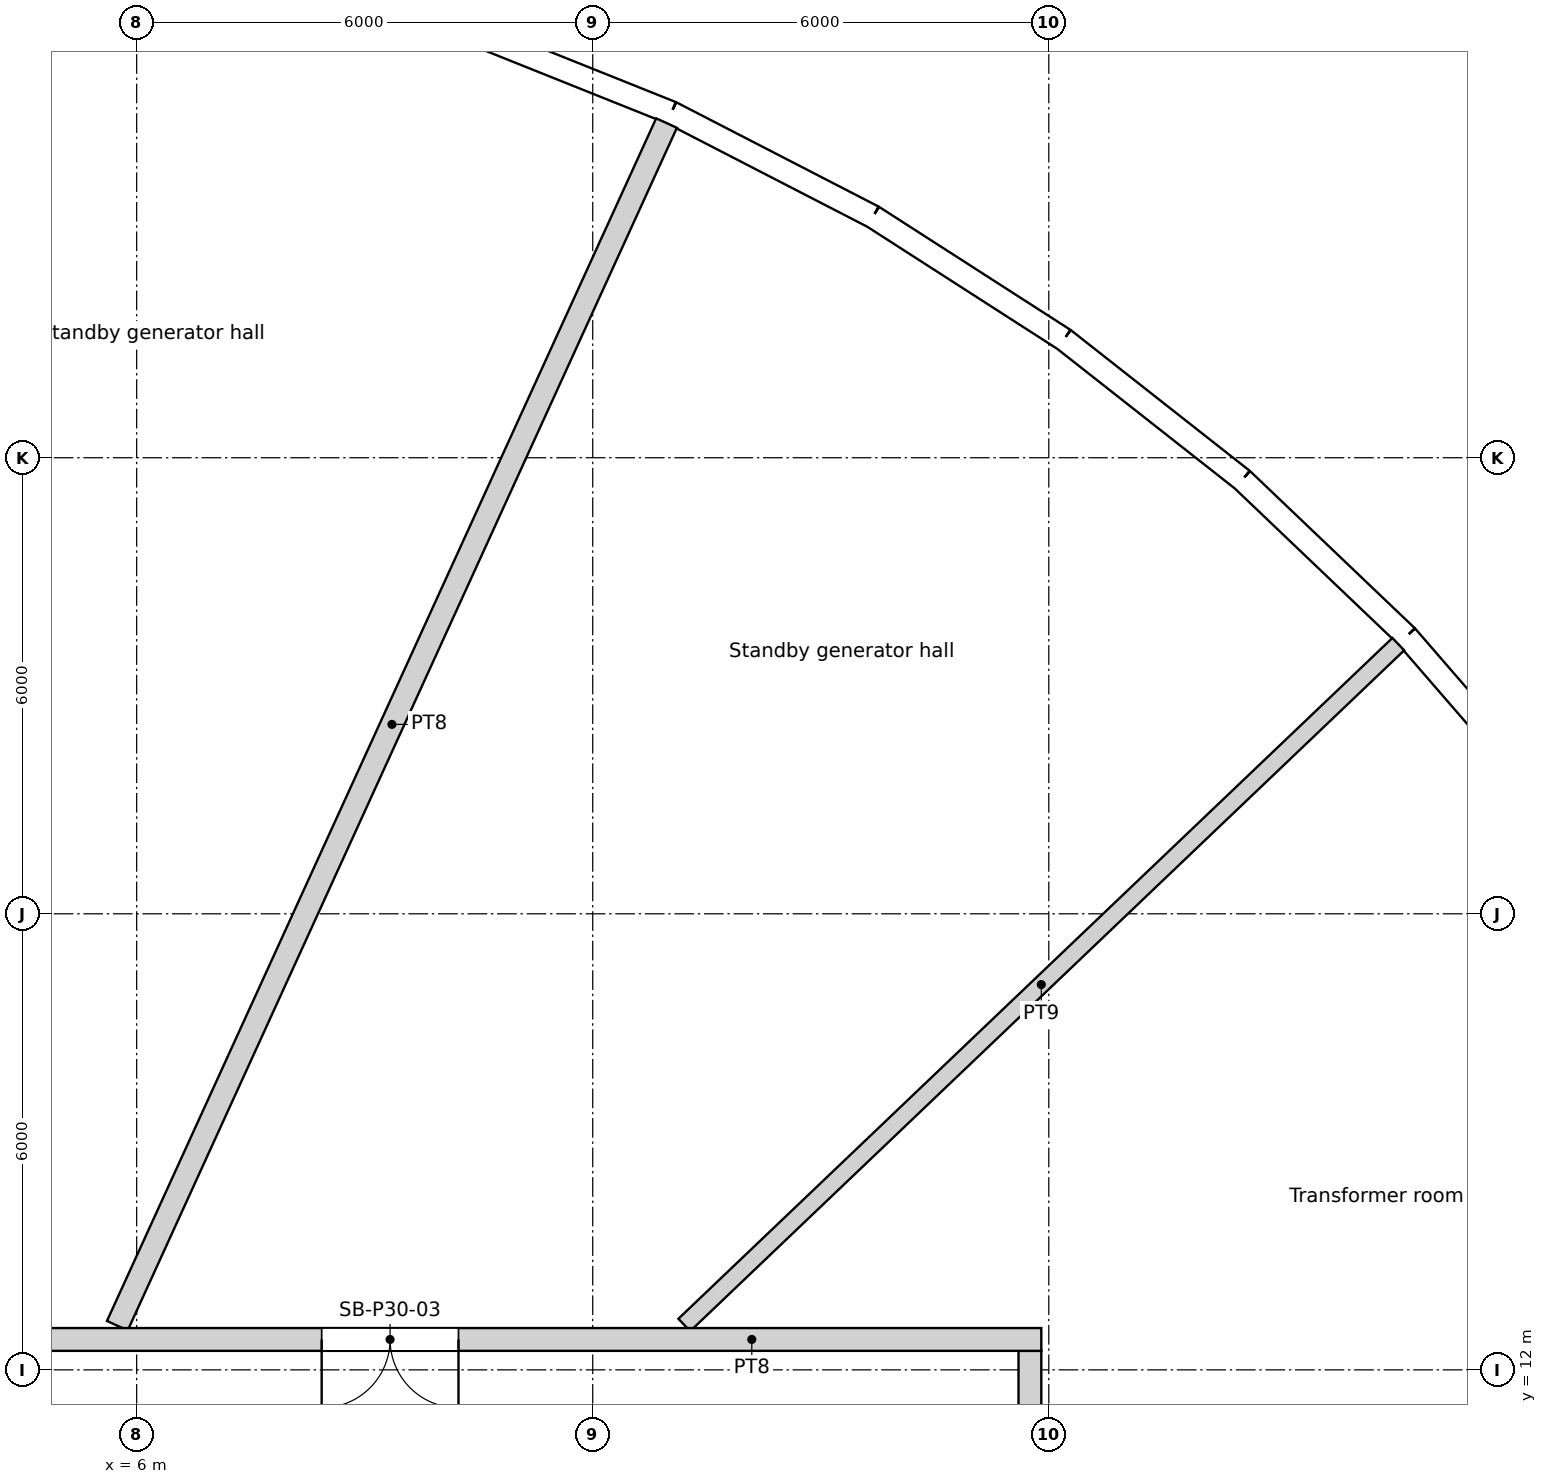
"""IFC4 building model, lengths in metres.
Left out: names, types, materials, properties, quantities, classifications, styles, units other than length and angle.
Written with IfcOpenShell. Run it as: python <this file> out.ifc"""

import sys

from ifc_helpers import new_model, si_unit, direction, frame, frame_2d, origin, origin_2d, place, context, subcontext, project, spatial, rectangle, circle, extrude, element, fill, save


model = new_model("IFC4")
c1 = context("Model", 3, precision=1e-05, world=origin(), true_north=direction((0.0, 1.0)))
c2 = subcontext(c1, "Body", "Model", "MODEL_VIEW")
j1 = project(units=[si_unit("LENGTHUNIT", "METRE"), si_unit("PLANEANGLEUNIT", "RADIAN")], contexts=[c1])
p1 = place(None, origin())
s1 = spatial("IfcSite", under=j1, at=p1, CompositionType="ELEMENT")
p2 = place(p1, origin())
s2 = spatial("IfcBuilding", under=s1, at=p2, CompositionType="ELEMENT")
p3 = place(p2, frame((0.0, 0.0, 120.0)))
s3 = spatial("IfcBuildingStorey", under=s2, at=p3, CompositionType="ELEMENT", Elevation=120.0)
for number, where, z_axis, x_axis in (
    (1, (21.911, 20.892, 0.0), (0.0, 0.0, 1.0), (1.0, 0.0, 0.0)),
    (2, (17.561, 24.661, 0.0), (0.0, 0.0, 1.0), (1.0, 0.0, 0.0)),
    (3, (12.576, 27.539, 0.0), (0.0, 0.0, 1.0), (1.0, 0.0, 0.0)),
    (4, (7.137, 29.421, 0.0), (0.0, 0.0, 1.0), (1.0, 0.0, 0.0)),
):
    element("IfcColumn", number, at=place(p3, frame(where, z_axis=z_axis, x_axis=x_axis)), inside=s3, PredefinedType="COLUMN", context=c2, shape_type="SweptSolid", body=[
        extrude(circle(Radius=0.6, at=origin_2d()), origin(), (0.0, 0.0, 1.0), 6.0),
    ])
for number, where, z_axis, x_axis in (
    (5, (21.937, 11.017, 0.0), (0.0, 0.0, 1.0), (1.0, 0.0, 0.0)),
    (6, (18.805, 15.779, 0.0), (0.0, 0.0, 1.0), (1.0, 0.0, 0.0)),
    (7, (14.659, 19.69, 0.0), (0.0, 0.0, 1.0), (1.0, 0.0, 0.0)),
    (8, (9.723, 22.54, 0.0), (0.0, 0.0, 1.0), (1.0, 0.0, 0.0)),
    (9, (4.263, 24.175, 0.0), (0.0, 0.0, 1.0), (1.0, 0.0, 0.0)),
):
    element("IfcColumn", number, at=place(p3, frame(where, z_axis=z_axis, x_axis=x_axis)), inside=s3, PredefinedType="COLUMN", context=c2, shape_type="SweptSolid", body=[
        extrude(circle(Radius=0.65, at=origin_2d()), origin(), (0.0, 0.0, 1.0), 6.0),
    ])
for number, where, z_axis, x_axis in (
    (10, (11.735, 14.716, 0.0), (0.0, 0.0, 1.0), (1.0, 0.0, 0.0)),
    (11, (6.876, 17.521, 0.0), (0.0, 0.0, 1.0), (1.0, 0.0, 0.0)),
):
    element("IfcColumn", number, at=place(p3, frame(where, z_axis=z_axis, x_axis=x_axis)), inside=s3, PredefinedType="COLUMN", context=c2, shape_type="SweptSolid", body=[
        extrude(circle(Radius=0.7, at=origin_2d()), origin(), (0.0, 0.0, 1.0), 6.0),
    ])
p4 = place(p3, frame((24.662, 19.394, 0.0), z_axis=(0.0, 0.0, 1.0), x_axis=(-0.654809121128, 0.755794294029, 0.0)))
e12 = element("IfcWall", 12, at=p4, inside=s3, PredefinedType="SOLIDWALL", context=c2, shape_type="SweptSolid", body=[
    extrude(rectangle(XDim=2.986, YDim=0.3, at=frame_2d((1.493, 0.0))), origin(), (0.0, 0.0, 1.0), 5.7),
])
p5 = place(p4, frame((1.493, 0.0, 1.8)))
e13 = element("IfcOpeningElement", 13, at=p5, cuts=e12, PredefinedType="OPENING", context=c2, shape_type="SweptSolid", body=[
    extrude(circle(Radius=1.2, at=origin_2d()), frame((0.0, 0.16, 0.0), z_axis=(0.0, -1.0, 0.0), x_axis=(1.0, 0.0, 0.0)), (0.0, 0.0, 1.0), 0.32),
])
p6 = place(p3, frame((22.707, 21.651, 0.0), z_axis=(0.0, 0.0, 1.0), x_axis=(-0.723750841228, 0.690061388444, 0.0)))
e14 = element("IfcWall", 14, at=p6, inside=s3, PredefinedType="SOLIDWALL", context=c2, shape_type="SweptSolid", body=[
    extrude(rectangle(XDim=2.986, YDim=0.3, at=frame_2d((1.493, 0.0))), origin(), (0.0, 0.0, 1.0), 5.7),
])
p7 = place(p6, frame((1.493, 0.0, 1.8)))
e15 = element("IfcOpeningElement", 15, at=p7, cuts=e14, PredefinedType="OPENING", context=c2, shape_type="SweptSolid", body=[
    extrude(circle(Radius=1.2, at=origin_2d()), frame((0.0, 0.16, 0.0), z_axis=(0.0, -1.0, 0.0), x_axis=(1.0, 0.0, 0.0)), (0.0, 0.0, 1.0), 0.32),
])
p8 = place(p3, frame((20.546, 23.711, 0.0), z_axis=(0.0, 0.0, 1.0), x_axis=(-0.786043032847, 0.618171780747, 0.0)))
e16 = element("IfcWall", 16, at=p8, inside=s3, PredefinedType="SOLIDWALL", context=c2, shape_type="SweptSolid", body=[
    extrude(rectangle(XDim=2.986, YDim=0.3, at=frame_2d((1.493, 0.0))), origin(), (0.0, 0.0, 1.0), 5.7),
])
p9 = place(p8, frame((1.493, 0.0, 1.8)))
e17 = element("IfcOpeningElement", 17, at=p9, cuts=e16, PredefinedType="OPENING", context=c2, shape_type="SweptSolid", body=[
    extrude(circle(Radius=1.2, at=origin_2d()), frame((0.0, 0.16, 0.0), z_axis=(0.0, -1.0, 0.0), x_axis=(1.0, 0.0, 0.0)), (0.0, 0.0, 1.0), 0.32),
])
p10 = place(p3, frame((18.199, 25.557, 0.0), z_axis=(0.0, 0.0, 1.0), x_axis=(-0.841242231846, 0.540658401727, 0.0)))
e18 = element("IfcWall", 18, at=p10, inside=s3, PredefinedType="SOLIDWALL", context=c2, shape_type="SweptSolid", body=[
    extrude(rectangle(XDim=2.986, YDim=0.3, at=frame_2d((1.493, 0.0))), origin(), (0.0, 0.0, 1.0), 5.7),
])
p11 = place(p10, frame((1.493, 0.0, 1.8)))
e19 = element("IfcOpeningElement", 19, at=p11, cuts=e18, PredefinedType="OPENING", context=c2, shape_type="SweptSolid", body=[
    extrude(circle(Radius=1.2, at=origin_2d()), frame((0.0, 0.16, 0.0), z_axis=(0.0, -1.0, 0.0), x_axis=(1.0, 0.0, 0.0)), (0.0, 0.0, 1.0), 0.32),
])
p12 = place(p3, frame((15.687, 27.171, 0.0), z_axis=(0.0, 0.0, 1.0), x_axis=(-0.888831268481, 0.458234630043, 0.0)))
e20 = element("IfcWall", 20, at=p12, inside=s3, PredefinedType="SOLIDWALL", context=c2, shape_type="SweptSolid", body=[
    extrude(rectangle(XDim=2.986, YDim=0.3, at=frame_2d((1.493, 0.0))), origin(), (0.0, 0.0, 1.0), 5.7),
])
p13 = place(p12, frame((1.493, 0.0, 1.8)))
e21 = element("IfcOpeningElement", 21, at=p13, cuts=e20, PredefinedType="OPENING", context=c2, shape_type="SweptSolid", body=[
    extrude(circle(Radius=1.2, at=origin_2d()), frame((0.0, 0.16, 0.0), z_axis=(0.0, -1.0, 0.0), x_axis=(1.0, 0.0, 0.0)), (0.0, 0.0, 1.0), 0.32),
])
p14 = place(p3, frame((13.033, 28.539, 0.0), z_axis=(0.0, 0.0, 1.0), x_axis=(-0.928380795373, 0.371630325434, 0.0)))
e22 = element("IfcWall", 22, at=p14, inside=s3, PredefinedType="SOLIDWALL", context=c2, shape_type="SweptSolid", body=[
    extrude(rectangle(XDim=2.986, YDim=0.3, at=frame_2d((1.493, 0.0))), origin(), (0.0, 0.0, 1.0), 5.7),
])
p15 = place(p14, frame((1.493, 0.0, 1.8)))
e23 = element("IfcOpeningElement", 23, at=p15, cuts=e22, PredefinedType="OPENING", context=c2, shape_type="SweptSolid", body=[
    extrude(circle(Radius=1.2, at=origin_2d()), frame((0.0, 0.16, 0.0), z_axis=(0.0, -1.0, 0.0), x_axis=(1.0, 0.0, 0.0)), (0.0, 0.0, 1.0), 0.32),
])
p16 = place(p3, frame((12.971, 28.403, 0.0), z_axis=(0.0, 0.0, 1.0), x_axis=(-0.415415069181, -0.909631969698, 0.0)))
e24 = element("IfcWall", 24, at=p16, inside=s3, PredefinedType="PARTITIONING", context=c2, shape_type="SweptSolid", body=[
    extrude(rectangle(XDim=17.393, YDim=0.3, at=frame_2d((8.697, 0.0))), origin(), (0.0, 0.0, 1.0), 5.2),
])
p17 = place(p3, frame((17.752, 8.253, 0.0), z_axis=(0.0, 0.0, 1.0), x_axis=(0.0, 1.0, 0.0)))
e25 = element("IfcWall", 25, at=p17, inside=s3, PredefinedType="PARTITIONING", context=c2, shape_type="SweptSolid", body=[
    extrude(rectangle(XDim=3.997, YDim=0.3, at=frame_2d((1.999, 0.0))), origin(), (0.0, 0.0, 1.0), 5.2),
])
p18 = place(p17, frame((1.649, 0.0, 0.0)))
e26 = element("IfcOpeningElement", 26, at=p18, cuts=e25, PredefinedType="OPENING", context=c2, shape_type="SweptSolid", body=[
    extrude(rectangle(XDim=1.0, YDim=2.1, at=frame_2d((0.5, 1.05))), frame((0.0, 0.15, 0.0), z_axis=(0.0, -1.0, 0.0), x_axis=(1.0, 0.0, 0.0)), (0.0, 0.0, 1.0), 0.3),
])
p19 = place(p3, frame((17.902, 12.4, 0.0), z_axis=(0.0, 0.0, 1.0), x_axis=(-1.0, 0.0, 0.0)))
e27 = element("IfcWall", 27, at=p19, inside=s3, PredefinedType="PARTITIONING", context=c2, shape_type="SweptSolid", body=[
    extrude(rectangle(XDim=17.311, YDim=0.3, at=frame_2d((8.655, 0.0))), origin(), (0.0, 0.0, 1.0), 5.2),
])
p20 = place(p19, frame((7.668, 0.0, 0.0)))
e28 = element("IfcOpeningElement", 28, at=p20, cuts=e27, PredefinedType="OPENING", context=c2, shape_type="SweptSolid", body=[
    extrude(rectangle(XDim=1.8, YDim=2.4, at=frame_2d((0.9, 1.2))), frame((0.0, 0.15, 0.0), z_axis=(0.0, -1.0, 0.0), x_axis=(1.0, 0.0, 0.0)), (0.0, 0.0, 1.0), 0.3),
])
p21 = place(p19, frame((13.875, 0.0, 0.0)))
e29 = element("IfcOpeningElement", 29, at=p21, cuts=e27, PredefinedType="OPENING", context=c2, shape_type="SweptSolid", body=[
    extrude(rectangle(XDim=1.8, YDim=2.4, at=frame_2d((0.9, 1.2))), frame((0.0, 0.15, 0.0), z_axis=(0.0, -1.0, 0.0), x_axis=(1.0, 0.0, 0.0)), (0.0, 0.0, 1.0), 0.3),
])
p22 = place(p3, frame((22.598, 21.547, 0.0), z_axis=(0.0, 0.0, 1.0), x_axis=(-0.723750872009, -0.690061356161, 0.0)))
e30 = element("IfcWall", 30, at=p22, inside=s3, PredefinedType="PARTITIONING", context=c2, shape_type="SweptSolid", body=[
    extrude(rectangle(XDim=12.979, YDim=0.225, at=frame_2d((6.49, 0.0))), origin(), (0.0, 0.0, 1.0), 2.7),
])
p23 = place(p3, frame((28.988, 11.605, 0.0), z_axis=(0.0, 0.0, 1.0), x_axis=(-0.928363284364, -0.37167406722, 0.0)))
e31 = element("IfcWall", 31, at=p23, inside=s3, PredefinedType="PARTITIONING", context=c2, shape_type="SweptSolid", body=[
    extrude(rectangle(XDim=13.367, YDim=0.3, at=frame_2d((6.684, 0.0))), origin(), (0.0, 0.0, 1.0), 5.2),
])
p24 = place(p5, origin())
e32 = element("IfcWindow", 32, at=p24, inside=s3, PartitioningType="SINGLE_PANEL", PredefinedType="WINDOW", context=c2, shape_type="SweptSolid", body=[
    extrude(circle(Radius=1.2, at=origin_2d()), frame((0.0, 0.12, 0.0), z_axis=(0.0, -1.0, 0.0), x_axis=(1.0, 0.0, 0.0)), (0.0, 0.0, 1.0), 0.1),
])
fill(e13, e32)
p25 = place(p7, origin())
e33 = element("IfcWindow", 33, at=p25, inside=s3, PartitioningType="SINGLE_PANEL", PredefinedType="WINDOW", context=c2, shape_type="SweptSolid", body=[
    extrude(circle(Radius=1.2, at=origin_2d()), frame((0.0, 0.12, 0.0), z_axis=(0.0, -1.0, 0.0), x_axis=(1.0, 0.0, 0.0)), (0.0, 0.0, 1.0), 0.1),
])
fill(e15, e33)
p26 = place(p9, origin())
e34 = element("IfcWindow", 34, at=p26, inside=s3, PartitioningType="SINGLE_PANEL", PredefinedType="WINDOW", context=c2, shape_type="SweptSolid", body=[
    extrude(circle(Radius=1.2, at=origin_2d()), frame((0.0, 0.12, 0.0), z_axis=(0.0, -1.0, 0.0), x_axis=(1.0, 0.0, 0.0)), (0.0, 0.0, 1.0), 0.1),
])
fill(e17, e34)
p27 = place(p11, origin())
e35 = element("IfcWindow", 35, at=p27, inside=s3, PartitioningType="SINGLE_PANEL", PredefinedType="WINDOW", context=c2, shape_type="SweptSolid", body=[
    extrude(circle(Radius=1.2, at=origin_2d()), frame((0.0, 0.12, 0.0), z_axis=(0.0, -1.0, 0.0), x_axis=(1.0, 0.0, 0.0)), (0.0, 0.0, 1.0), 0.1),
])
fill(e19, e35)
p28 = place(p13, origin())
e36 = element("IfcWindow", 36, at=p28, inside=s3, PartitioningType="SINGLE_PANEL", PredefinedType="WINDOW", context=c2, shape_type="SweptSolid", body=[
    extrude(circle(Radius=1.2, at=origin_2d()), frame((0.0, 0.12, 0.0), z_axis=(0.0, -1.0, 0.0), x_axis=(1.0, 0.0, 0.0)), (0.0, 0.0, 1.0), 0.1),
])
fill(e21, e36)
p29 = place(p15, origin())
e37 = element("IfcWindow", 37, at=p29, inside=s3, PartitioningType="SINGLE_PANEL", PredefinedType="WINDOW", context=c2, shape_type="SweptSolid", body=[
    extrude(circle(Radius=1.2, at=origin_2d()), frame((0.0, 0.12, 0.0), z_axis=(0.0, -1.0, 0.0), x_axis=(1.0, 0.0, 0.0)), (0.0, 0.0, 1.0), 0.1),
])
fill(e23, e37)
p30 = place(p20, origin())
e38 = element("IfcDoor", 38, at=p30, inside=s3, OperationType="DOUBLE_DOOR_SINGLE_SWING", PredefinedType="DOOR", context=c2, shape_type="SweptSolid", body=[
    extrude(rectangle(XDim=1.8, YDim=2.4, at=frame_2d((0.9, 1.2))), frame((0.0, 0.025, 0.0), z_axis=(0.0, -1.0, 0.0), x_axis=(1.0, 0.0, 0.0)), (0.0, 0.0, 1.0), 0.05),
])
fill(e28, e38)
save(model, sys.argv[1])
